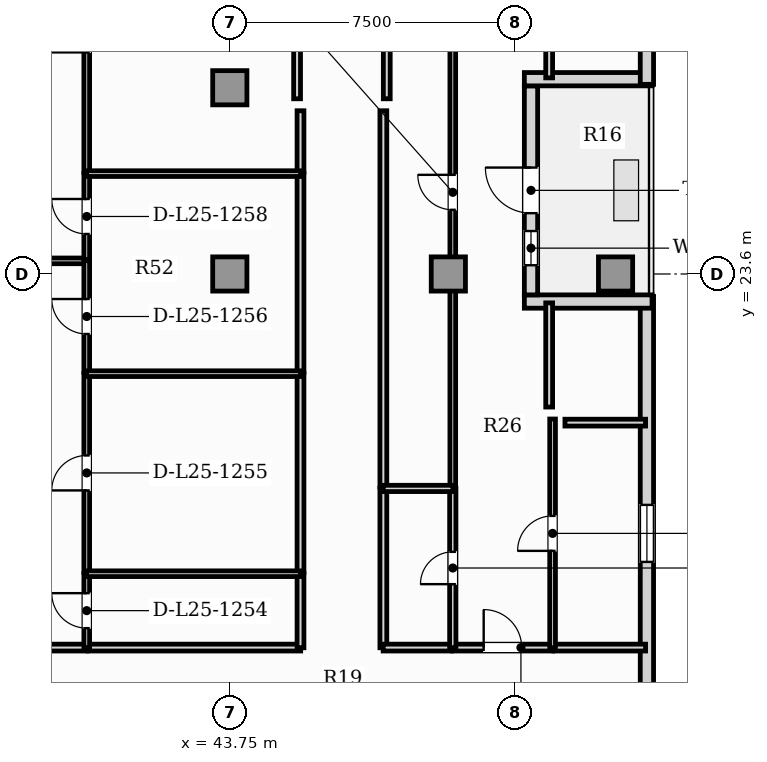
"""IFC4 building model, lengths in metres.
Left out: names, types, materials, properties, quantities, classifications, styles, units other than length and angle.
Written with IfcOpenShell. Run it as: python <this file> out.ifc"""

import sys

from ifc_helpers import new_model, si_unit, direction, frame, frame_2d, origin, origin_2d, place, context, subcontext, project, spatial, rectangle, extrude, element, fill, save


model = new_model("IFC4")
c1 = context("Model", 3, precision=1e-05, world=origin(), true_north=direction((0.0, 1.0)))
c2 = subcontext(c1, "Body", "Model", "MODEL_VIEW")
j1 = project(units=[si_unit("LENGTHUNIT", "METRE"), si_unit("PLANEANGLEUNIT", "RADIAN")], contexts=[c1])
p1 = place(None, origin())
s1 = spatial("IfcSite", under=j1, at=p1, CompositionType="ELEMENT")
p2 = place(p1, origin())
s2 = spatial("IfcBuilding", under=s1, at=p2, CompositionType="ELEMENT")
p3 = place(p2, frame((0.0, 0.0, 104.15)))
s3 = spatial("IfcBuildingStorey", under=s2, at=p3, CompositionType="ELEMENT", Elevation=104.15)
for number, where, z_axis, x_axis in (
    (1, (43.75, 23.6, 0.0), (0.0, 0.0, 1.0), (1.0, 0.0, 0.0)),
    (2, (49.5, 23.6, 0.0), (0.0, 0.0, 1.0), (1.0, 0.0, 0.0)),
    (3, (53.9, 23.6, 0.0), (0.0, 0.0, 1.0), (1.0, 0.0, 0.0)),
    (4, (43.75, 28.5, 0.0), (0.0, 0.0, 1.0), (1.0, 0.0, 0.0)),
):
    element("IfcColumn", number, at=place(p3, frame(where, z_axis=z_axis, x_axis=x_axis)), inside=s3, PredefinedType="COLUMN", context=c2, shape_type="SweptSolid", body=[
        extrude(rectangle(XDim=0.9, YDim=0.9, at=origin_2d()), origin(), (0.0, 0.0, 1.0), 3.85),
    ])
p4 = place(p3, frame((54.725, 3.24, 0.0), z_axis=(0.0, 0.0, 1.0), x_axis=(0.0, 1.0, 0.0)))
e5 = element("IfcWall", 5, at=p4, inside=s3, PredefinedType="SOLIDWALL", context=c2, shape_type="SweptSolid", body=[
    extrude(rectangle(XDim=19.77, YDim=0.35, at=frame_2d((9.885, 0.0))), origin(), (0.0, 0.0, 1.0), 3.6),
])
p5 = place(p4, frame((12.784, 0.0, 0.9)))
e6 = element("IfcOpeningElement", 6, at=p5, cuts=e5, PredefinedType="OPENING", context=c2, shape_type="SweptSolid", body=[
    extrude(rectangle(XDim=1.5, YDim=1.95, at=frame_2d((0.75, 0.975))), frame((0.0, 0.185, 0.0), z_axis=(0.0, -1.0, 0.0), x_axis=(1.0, 0.0, 0.0)), (0.0, 0.0, 1.0), 0.37),
])
p6 = place(p3, frame((54.86, 22.875, 0.0), z_axis=(0.0, 0.0, 1.0), x_axis=(-1.0, 0.0, 0.0)))
e7 = element("IfcWall", 7, at=p6, inside=s3, PredefinedType="SOLIDWALL", context=c2, shape_type="SweptSolid", body=[
    extrude(rectangle(XDim=3.36, YDim=0.35, at=frame_2d((1.68, 0.0))), origin(), (0.0, 0.0, 1.0), 3.6),
])
p7 = place(p3, frame((51.675, 23.05, 0.0), z_axis=(0.0, 0.0, 1.0), x_axis=(0.0, 1.0, 0.0)))
e8 = element("IfcWall", 8, at=p7, inside=s3, PredefinedType="SOLIDWALL", context=c2, shape_type="SweptSolid", body=[
    extrude(rectangle(XDim=5.5, YDim=0.35, at=frame_2d((2.75, 0.0))), origin(), (0.0, 0.0, 1.0), 3.6),
])
p8 = place(p7, frame((2.15, 0.0, 0.0)))
e9 = element("IfcOpeningElement", 9, at=p8, cuts=e8, PredefinedType="OPENING", context=c2, shape_type="SweptSolid", body=[
    extrude(rectangle(XDim=1.2, YDim=2.2, at=frame_2d((0.6, 1.1))), frame((0.0, 0.185, 0.0), z_axis=(0.0, -1.0, 0.0), x_axis=(1.0, 0.0, 0.0)), (0.0, 0.0, 1.0), 0.37),
])
p9 = place(p7, frame((0.78, 0.0, 0.95)))
e10 = element("IfcOpeningElement", 10, at=p9, cuts=e8, PredefinedType="OPENING", context=c2, shape_type="SweptSolid", body=[
    extrude(rectangle(XDim=0.9, YDim=1.5, at=frame_2d((0.45, 0.75))), frame((0.0, 0.185, 0.0), z_axis=(0.0, -1.0, 0.0), x_axis=(1.0, 0.0, 0.0)), (0.0, 0.0, 1.0), 0.37),
])
p10 = place(p3, frame((51.5, 28.725, 0.0), z_axis=(0.0, 0.0, 1.0), x_axis=(1.0, 0.0, 0.0)))
e11 = element("IfcWall", 11, at=p10, inside=s3, PredefinedType="SOLIDWALL", context=c2, shape_type="SweptSolid", body=[
    extrude(rectangle(XDim=3.36, YDim=0.35, at=frame_2d((1.68, 0.0))), origin(), (0.0, 0.0, 1.0), 3.6),
])
p11 = place(p3, frame((54.725, 28.59, 0.0), z_axis=(0.0, 0.0, 1.0), x_axis=(0.0, 1.0, 0.0)))
e12 = element("IfcWall", 12, at=p11, inside=s3, PredefinedType="SOLIDWALL", context=c2, shape_type="SweptSolid", body=[
    extrude(rectangle(XDim=11.37, YDim=0.35, at=frame_2d((5.685, 0.0))), origin(), (0.0, 0.0, 1.0), 3.6),
])
p12 = place(p11, frame((7.472, 0.0, 0.9)))
e13 = element("IfcOpeningElement", 13, at=p12, cuts=e12, PredefinedType="OPENING", context=c2, shape_type="SweptSolid", body=[
    extrude(rectangle(XDim=1.5, YDim=1.95, at=frame_2d((0.75, 0.975))), frame((0.0, 0.185, 0.0), z_axis=(0.0, -1.0, 0.0), x_axis=(1.0, 0.0, 0.0)), (0.0, 0.0, 1.0), 0.37),
])
p13 = place(p3, frame((49.612, 13.77, 0.0), z_axis=(0.0, 0.0, 1.0), x_axis=(1.0, 0.0, 0.0)))
e14 = element("IfcWall", 14, at=p13, inside=s3, PredefinedType="PARTITIONING", context=c2, shape_type="SweptSolid", body=[
    extrude(rectangle(XDim=2.636, YDim=0.18, at=frame_2d((1.318, 0.0))), origin(), (0.0, 0.0, 1.0), 3.6),
])
p14 = place(p13, frame((0.818, 0.0, 0.0)))
e15 = element("IfcOpeningElement", 15, at=p14, cuts=e14, PredefinedType="OPENING", context=c2, shape_type="SweptSolid", body=[
    extrude(rectangle(XDim=1.0, YDim=2.15, at=frame_2d((0.5, 1.075))), frame((0.0, 0.1, 0.0), z_axis=(0.0, -1.0, 0.0), x_axis=(1.0, 0.0, 0.0)), (0.0, 0.0, 1.0), 0.2),
])
p15 = place(p3, frame((47.79, 13.765, 0.0), z_axis=(0.0, 0.0, 1.0), x_axis=(0.0, 1.0, 0.0)))
e16 = element("IfcWall", 16, at=p15, inside=s3, PredefinedType="PARTITIONING", context=c2, shape_type="SweptSolid", body=[
    extrude(rectangle(XDim=4.198, YDim=0.18, at=frame_2d((2.099, 0.0))), origin(), (0.0, 0.0, 1.0), 3.6),
])
p16 = place(p3, frame((47.785, 13.77, 0.0), z_axis=(0.0, 0.0, 1.0), x_axis=(1.0, 0.0, 0.0)))
e17 = element("IfcWall", 17, at=p16, inside=s3, PredefinedType="PARTITIONING", context=c2, shape_type="SweptSolid", body=[
    extrude(rectangle(XDim=1.797, YDim=0.18, at=frame_2d((0.898, 0.0))), origin(), (0.0, 0.0, 1.0), 3.6),
])
p17 = place(p3, frame((47.79, 17.992, 0.0), z_axis=(0.0, 0.0, 1.0), x_axis=(0.0, 1.0, 0.0)))
e18 = element("IfcWall", 18, at=p17, inside=s3, PredefinedType="PARTITIONING", context=c2, shape_type="SweptSolid", body=[
    extrude(rectangle(XDim=9.903, YDim=0.18, at=frame_2d((4.951, 0.0))), origin(), (0.0, 0.0, 1.0), 3.6),
])
p18 = place(p3, frame((52.278, 13.77, 0.0), z_axis=(0.0, 0.0, 1.0), x_axis=(1.0, 0.0, 0.0)))
e19 = element("IfcWall", 19, at=p18, inside=s3, PredefinedType="PARTITIONING", context=c2, shape_type="SweptSolid", body=[
    extrude(rectangle(XDim=2.412, YDim=0.18, at=frame_2d((1.206, 0.0))), origin(), (0.0, 0.0, 1.0), 3.6),
])
p19 = place(p3, frame((35.0, 13.77, 0.0), z_axis=(0.0, 0.0, 1.0), x_axis=(1.0, 0.0, 0.0)))
e20 = element("IfcWall", 20, at=p19, inside=s3, PredefinedType="PARTITIONING", context=c2, shape_type="SweptSolid", body=[
    extrude(rectangle(XDim=4.99, YDim=0.18, at=frame_2d((2.495, 0.0))), origin(), (0.0, 0.0, 1.0), 3.6),
])
p20 = place(p19, frame((1.995, 0.0, 0.0)))
e21 = element("IfcOpeningElement", 21, at=p20, cuts=e20, PredefinedType="OPENING", context=c2, shape_type="SweptSolid", body=[
    extrude(rectangle(XDim=1.0, YDim=2.15, at=frame_2d((0.5, 1.075))), frame((0.0, 0.1, 0.0), z_axis=(0.0, -1.0, 0.0), x_axis=(1.0, 0.0, 0.0)), (0.0, 0.0, 1.0), 0.2),
])
p21 = place(p3, frame((40.021, 13.77, 0.0), z_axis=(0.0, 0.0, 1.0), x_axis=(1.0, 0.0, 0.0)))
e22 = element("IfcWall", 22, at=p21, inside=s3, PredefinedType="PARTITIONING", context=c2, shape_type="SweptSolid", body=[
    extrude(rectangle(XDim=5.594, YDim=0.18, at=frame_2d((2.797, 0.0))), origin(), (0.0, 0.0, 1.0), 3.6),
])
p22 = place(p3, frame((45.61, 13.765, 0.0), z_axis=(0.0, 0.0, 1.0), x_axis=(0.0, 1.0, 0.0)))
e23 = element("IfcWall", 23, at=p22, inside=s3, PredefinedType="PARTITIONING", context=c2, shape_type="SweptSolid", body=[
    extrude(rectangle(XDim=1.953, YDim=0.18, at=frame_2d((0.977, 0.0))), origin(), (0.0, 0.0, 1.0), 3.6),
])
for number, where, z_axis, x_axis in (
    (24, (45.61, 15.748, 0.0), (0.0, 0.0, 1.0), (0.0, 1.0, 0.0)),
    (25, (45.61, 21.012, 0.0), (0.0, 0.0, 1.0), (0.0, 1.0, 0.0)),
):
    element("IfcWall", number, at=place(p3, frame(where, z_axis=z_axis, x_axis=x_axis)), inside=s3, PredefinedType="PARTITIONING", context=c2, shape_type="SweptSolid", body=[
        extrude(rectangle(XDim=5.234, YDim=0.18, at=frame_2d((2.617, 0.0))), origin(), (0.0, 0.0, 1.0), 3.6),
    ])
p23 = place(p3, frame((45.61, 26.276, 0.0), z_axis=(0.0, 0.0, 1.0), x_axis=(0.0, 1.0, 0.0)))
e26 = element("IfcWall", 26, at=p23, inside=s3, PredefinedType="PARTITIONING", context=c2, shape_type="SweptSolid", body=[
    extrude(rectangle(XDim=1.619, YDim=0.18, at=frame_2d((0.81, 0.0))), origin(), (0.0, 0.0, 1.0), 3.6),
])
p24 = place(p3, frame((49.617, 13.765, 0.0), z_axis=(0.0, 0.0, 1.0), x_axis=(0.0, 1.0, 0.0)))
e27 = element("IfcWall", 27, at=p24, inside=s3, PredefinedType="PLUMBINGWALL", context=c2, shape_type="SweptSolid", body=[
    extrude(rectangle(XDim=4.198, YDim=0.165, at=frame_2d((2.099, 0.0))), origin(), (0.0, 0.0, 1.0), 3.056),
])
p25 = place(p24, frame((1.674, 0.0, 0.0)))
e28 = element("IfcOpeningElement", 28, at=p25, cuts=e27, PredefinedType="OPENING", context=c2, shape_type="SweptSolid", body=[
    extrude(rectangle(XDim=0.85, YDim=2.1, at=frame_2d((0.425, 1.05))), frame((0.0, 0.093, 0.0), z_axis=(0.0, -1.0, 0.0), x_axis=(1.0, 0.0, 0.0)), (0.0, 0.0, 1.0), 0.185),
])
p26 = place(p3, frame((49.617, 17.992, 0.0), z_axis=(0.0, 0.0, 1.0), x_axis=(0.0, 1.0, 0.0)))
e29 = element("IfcWall", 29, at=p26, inside=s3, PredefinedType="PARTITIONING", context=c2, shape_type="SweptSolid", body=[
    extrude(rectangle(XDim=15.513, YDim=0.15, at=frame_2d((7.756, 0.0))), origin(), (0.0, 0.0, 1.0), 3.056),
])
p27 = place(p26, frame((7.296, 0.0, 0.0)))
e30 = element("IfcOpeningElement", 30, at=p27, cuts=e29, PredefinedType="OPENING", context=c2, shape_type="SweptSolid", body=[
    extrude(rectangle(XDim=0.92, YDim=2.1, at=frame_2d((0.46, 1.05))), frame((0.0, 0.085, 0.0), z_axis=(0.0, -1.0, 0.0), x_axis=(1.0, 0.0, 0.0)), (0.0, 0.0, 1.0), 0.17),
])
p28 = place(p3, frame((52.243, 13.765, 0.0), z_axis=(0.0, 0.0, 1.0), x_axis=(0.0, 1.0, 0.0)))
e31 = element("IfcWall", 31, at=p28, inside=s3, PredefinedType="PARTITIONING", context=c2, shape_type="SweptSolid", body=[
    extrude(rectangle(XDim=6.019, YDim=0.15, at=frame_2d((3.009, 0.0))), origin(), (0.0, 0.0, 1.0), 3.6),
])
p29 = place(p28, frame((2.549, 0.0, 0.0)))
e32 = element("IfcOpeningElement", 32, at=p29, cuts=e31, PredefinedType="OPENING", context=c2, shape_type="SweptSolid", body=[
    extrude(rectangle(XDim=0.92, YDim=2.1, at=frame_2d((0.46, 1.05))), frame((0.0, 0.085, 0.0), z_axis=(0.0, -1.0, 0.0), x_axis=(1.0, 0.0, 0.0)), (0.0, 0.0, 1.0), 0.17),
])
p30 = place(p3, frame((47.785, 17.957, 0.0), z_axis=(0.0, 0.0, 1.0), x_axis=(1.0, 0.0, 0.0)))
e33 = element("IfcWall", 33, at=p30, inside=s3, PredefinedType="PLUMBINGWALL", context=c2, shape_type="SweptSolid", body=[
    extrude(rectangle(XDim=1.837, YDim=0.165, at=frame_2d((0.918, 0.0))), origin(), (0.0, 0.0, 1.0), 3.6),
])
p31 = place(p3, frame((35.0, 23.945, 0.0), z_axis=(0.0, 0.0, 1.0), x_axis=(1.0, 0.0, 0.0)))
e34 = element("IfcWall", 34, at=p31, inside=s3, PredefinedType="PARTITIONING", context=c2, shape_type="SweptSolid", body=[
    extrude(rectangle(XDim=4.99, YDim=0.15, at=frame_2d((2.495, 0.0))), origin(), (0.0, 0.0, 1.0), 3.6),
])
p32 = place(p31, frame((2.035, 0.0, 0.0)))
e35 = element("IfcOpeningElement", 35, at=p32, cuts=e34, PredefinedType="OPENING", context=c2, shape_type="SweptSolid", body=[
    extrude(rectangle(XDim=0.92, YDim=2.1, at=frame_2d((0.46, 1.05))), frame((0.0, 0.085, 0.0), z_axis=(0.0, -1.0, 0.0), x_axis=(1.0, 0.0, 0.0)), (0.0, 0.0, 1.0), 0.17),
])
p33 = place(p3, frame((39.986, 13.765, 0.0), z_axis=(0.0, 0.0, 1.0), x_axis=(0.0, 1.0, 0.0)))
e36 = element("IfcWall", 36, at=p33, inside=s3, PredefinedType="PARTITIONING", context=c2, shape_type="SweptSolid", body=[
    extrude(rectangle(XDim=1.953, YDim=0.15, at=frame_2d((0.977, 0.0))), origin(), (0.0, 0.0, 1.0), 3.6),
])
p34 = place(p33, frame((0.517, 0.0, 0.0)))
e37 = element("IfcOpeningElement", 37, at=p34, cuts=e36, PredefinedType="OPENING", context=c2, shape_type="SweptSolid", body=[
    extrude(rectangle(XDim=0.92, YDim=2.1, at=frame_2d((0.46, 1.05))), frame((0.0, 0.085, 0.0), z_axis=(0.0, -1.0, 0.0), x_axis=(1.0, 0.0, 0.0)), (0.0, 0.0, 1.0), 0.17),
])
p35 = place(p3, frame((39.986, 15.748, 0.0), z_axis=(0.0, 0.0, 1.0), x_axis=(0.0, 1.0, 0.0)))
e38 = element("IfcWall", 38, at=p35, inside=s3, PredefinedType="PARTITIONING", context=c2, shape_type="SweptSolid", body=[
    extrude(rectangle(XDim=5.234, YDim=0.15, at=frame_2d((2.617, 0.0))), origin(), (0.0, 0.0, 1.0), 3.6),
])
p36 = place(p35, frame((2.157, 0.0, 0.0)))
e39 = element("IfcOpeningElement", 39, at=p36, cuts=e38, PredefinedType="OPENING", context=c2, shape_type="SweptSolid", body=[
    extrude(rectangle(XDim=0.92, YDim=2.1, at=frame_2d((0.46, 1.05))), frame((0.0, 0.085, 0.0), z_axis=(0.0, -1.0, 0.0), x_axis=(1.0, 0.0, 0.0)), (0.0, 0.0, 1.0), 0.17),
])
p37 = place(p3, frame((39.986, 21.012, 0.0), z_axis=(0.0, 0.0, 1.0), x_axis=(0.0, 1.0, 0.0)))
e40 = element("IfcWall", 40, at=p37, inside=s3, PredefinedType="PARTITIONING", context=c2, shape_type="SweptSolid", body=[
    extrude(rectangle(XDim=2.938, YDim=0.15, at=frame_2d((1.469, 0.0))), origin(), (0.0, 0.0, 1.0), 3.6),
])
p38 = place(p37, frame((1.009, 0.0, 0.0)))
e41 = element("IfcOpeningElement", 41, at=p38, cuts=e40, PredefinedType="OPENING", context=c2, shape_type="SweptSolid", body=[
    extrude(rectangle(XDim=0.92, YDim=2.1, at=frame_2d((0.46, 1.05))), frame((0.0, 0.085, 0.0), z_axis=(0.0, -1.0, 0.0), x_axis=(1.0, 0.0, 0.0)), (0.0, 0.0, 1.0), 0.17),
])
p39 = place(p3, frame((39.986, 23.98, 0.0), z_axis=(0.0, 0.0, 1.0), x_axis=(0.0, 1.0, 0.0)))
e42 = element("IfcWall", 42, at=p39, inside=s3, PredefinedType="PARTITIONING", context=c2, shape_type="SweptSolid", body=[
    extrude(rectangle(XDim=2.265, YDim=0.15, at=frame_2d((1.133, 0.0))), origin(), (0.0, 0.0, 1.0), 3.6),
])
p40 = place(p39, frame((0.673, 0.0, 0.0)))
e43 = element("IfcOpeningElement", 43, at=p40, cuts=e42, PredefinedType="OPENING", context=c2, shape_type="SweptSolid", body=[
    extrude(rectangle(XDim=0.92, YDim=2.1, at=frame_2d((0.46, 1.05))), frame((0.0, 0.085, 0.0), z_axis=(0.0, -1.0, 0.0), x_axis=(1.0, 0.0, 0.0)), (0.0, 0.0, 1.0), 0.17),
])
p41 = place(p3, frame((39.986, 26.276, 0.0), z_axis=(0.0, 0.0, 1.0), x_axis=(0.0, 1.0, 0.0)))
e44 = element("IfcWall", 44, at=p41, inside=s3, PredefinedType="PARTITIONING", context=c2, shape_type="SweptSolid", body=[
    extrude(rectangle(XDim=7.229, YDim=0.15, at=frame_2d((3.615, 0.0))), origin(), (0.0, 0.0, 1.0), 3.6),
])
p42 = place(p41, frame((3.155, 0.0, 0.0)))
e45 = element("IfcOpeningElement", 45, at=p42, cuts=e44, PredefinedType="OPENING", context=c2, shape_type="SweptSolid", body=[
    extrude(rectangle(XDim=0.92, YDim=2.1, at=frame_2d((0.46, 1.05))), frame((0.0, 0.085, 0.0), z_axis=(0.0, -1.0, 0.0), x_axis=(1.0, 0.0, 0.0)), (0.0, 0.0, 1.0), 0.17),
])
for number, where, z_axis, x_axis in (
    (46, (39.981, 15.713, 0.0), (0.0, 0.0, 1.0), (1.0, 0.0, 0.0)),
    (47, (39.981, 20.977, 0.0), (0.0, 0.0, 1.0), (1.0, 0.0, 0.0)),
    (48, (39.981, 26.241, 0.0), (0.0, 0.0, 1.0), (1.0, 0.0, 0.0)),
):
    element("IfcWall", number, at=place(p3, frame(where, z_axis=z_axis, x_axis=x_axis)), inside=s3, PredefinedType="PARTITIONING", context=c2, shape_type="SweptSolid", body=[
        extrude(rectangle(XDim=5.634, YDim=0.15, at=frame_2d((2.817, 0.0))), origin(), (0.0, 0.0, 1.0), 3.6),
    ])
p43 = place(p3, frame((52.153, 33.685, 0.0), z_axis=(0.0, 0.0, 1.0), x_axis=(0.0, -1.0, 0.0)))
e49 = element("IfcWall", 49, at=p43, inside=s3, PredefinedType="PARTITIONING", context=c2, shape_type="SweptSolid", body=[
    extrude(rectangle(XDim=4.925, YDim=0.18, at=frame_2d((2.462, 0.0))), origin(), (0.0, 0.0, 1.0), 3.6),
])
p44 = place(p3, frame((52.153, 22.84, 0.0), z_axis=(0.0, 0.0, 1.0), x_axis=(0.0, -1.0, 0.0)))
e50 = element("IfcWall", 50, at=p44, inside=s3, PredefinedType="PARTITIONING", context=c2, shape_type="SweptSolid", body=[
    extrude(rectangle(XDim=2.741, YDim=0.18, at=frame_2d((1.371, 0.0))), origin(), (0.0, 0.0, 1.0), 3.6),
])
p45 = place(p3, frame((47.88, 28.21, 0.0), z_axis=(0.0, 0.0, 1.0), x_axis=(0.0, 1.0, 0.0)))
e51 = element("IfcWall", 51, at=p45, inside=s3, PredefinedType="PARTITIONING", context=c2, shape_type="SweptSolid", body=[
    extrude(rectangle(XDim=4.965, YDim=0.18, at=frame_2d((2.482, 0.0))), origin(), (0.0, 0.0, 1.0), 3.6),
])
p46 = place(p3, frame((52.568, 19.689, 0.0), z_axis=(0.0, 0.0, 1.0), x_axis=(1.0, 0.0, 0.0)))
e52 = element("IfcWall", 52, at=p46, inside=s3, PredefinedType="PARTITIONING", context=c2, shape_type="SweptSolid", body=[
    extrude(rectangle(XDim=2.122, YDim=0.18, at=frame_2d((1.061, 0.0))), origin(), (0.0, 0.0, 1.0), 3.6),
])
p47 = place(p3, frame((45.52, 33.175, 0.0), z_axis=(0.0, 0.0, 1.0), x_axis=(0.0, -1.0, 0.0)))
e53 = element("IfcWall", 53, at=p47, inside=s3, PredefinedType="PARTITIONING", context=c2, shape_type="SweptSolid", body=[
    extrude(rectangle(XDim=4.965, YDim=0.18, at=frame_2d((2.482, 0.0))), origin(), (0.0, 0.0, 1.0), 3.6),
])
p48 = place(p8, frame((1.2, 0.0, 0.0), z_axis=(0.0, 0.0, 1.0), x_axis=(-1.0, 0.0, 0.0)))
e54 = element("IfcDoor", 54, at=p48, inside=s3, OperationType="SINGLE_SWING_LEFT", PredefinedType="DOOR", context=c2, shape_type="SweptSolid", body=[
    extrude(rectangle(XDim=1.2, YDim=2.2, at=frame_2d((0.6, 1.1))), frame((0.0, 0.025, 0.0), z_axis=(0.0, -1.0, 0.0), x_axis=(1.0, 0.0, 0.0)), (0.0, 0.0, 1.0), 0.05),
])
fill(e9, e54)
p49 = place(p9, origin())
e55 = element("IfcWindow", 55, at=p49, inside=s3, PartitioningType="SINGLE_PANEL", PredefinedType="WINDOW", context=c2, shape_type="SweptSolid", body=[
    extrude(rectangle(XDim=0.9, YDim=1.5, at=frame_2d((0.45, 0.75))), frame((0.0, 0.03, 0.0), z_axis=(0.0, -1.0, 0.0), x_axis=(1.0, 0.0, 0.0)), (0.0, 0.0, 1.0), 0.06),
])
fill(e10, e55)
p50 = place(p5, origin())
e56 = element("IfcWindow", 56, at=p50, inside=s3, PartitioningType="SINGLE_PANEL", PredefinedType="WINDOW", context=c2, shape_type="SweptSolid", body=[
    extrude(rectangle(XDim=1.5, YDim=1.95, at=frame_2d((0.75, 0.975))), frame((0.0, 0.03, 0.0), z_axis=(0.0, -1.0, 0.0), x_axis=(1.0, 0.0, 0.0)), (0.0, 0.0, 1.0), 0.06),
])
fill(e6, e56)
p51 = place(p14, origin())
e57 = element("IfcDoor", 57, at=p51, inside=s3, OperationType="SINGLE_SWING_LEFT", PredefinedType="DOOR", context=c2, shape_type="SweptSolid", body=[
    extrude(rectangle(XDim=1.0, YDim=2.15, at=frame_2d((0.5, 1.075))), frame((0.0, 0.025, 0.0), z_axis=(0.0, -1.0, 0.0), x_axis=(1.0, 0.0, 0.0)), (0.0, 0.0, 1.0), 0.05),
])
fill(e15, e57)
p52 = place(p25, origin())
e58 = element("IfcDoor", 58, at=p52, inside=s3, OperationType="SINGLE_SWING_LEFT", PredefinedType="DOOR", context=c2, shape_type="SweptSolid", body=[
    extrude(rectangle(XDim=0.85, YDim=2.1, at=frame_2d((0.425, 1.05))), frame((0.0, 0.025, 0.0), z_axis=(0.0, -1.0, 0.0), x_axis=(1.0, 0.0, 0.0)), (0.0, 0.0, 1.0), 0.05),
])
fill(e28, e58)
p53 = place(p27, origin())
e59 = element("IfcDoor", 59, at=p53, inside=s3, OperationType="SINGLE_SWING_RIGHT", PredefinedType="DOOR", context=c2, shape_type="SweptSolid", body=[
    extrude(rectangle(XDim=0.92, YDim=2.1, at=frame_2d((0.46, 1.05))), frame((0.0, 0.025, 0.0), z_axis=(0.0, -1.0, 0.0), x_axis=(1.0, 0.0, 0.0)), (0.0, 0.0, 1.0), 0.05),
])
fill(e30, e59)
p54 = place(p29, origin())
e60 = element("IfcDoor", 60, at=p54, inside=s3, OperationType="SINGLE_SWING_LEFT", PredefinedType="DOOR", context=c2, shape_type="SweptSolid", body=[
    extrude(rectangle(XDim=0.92, YDim=2.1, at=frame_2d((0.46, 1.05))), frame((0.0, 0.025, 0.0), z_axis=(0.0, -1.0, 0.0), x_axis=(1.0, 0.0, 0.0)), (0.0, 0.0, 1.0), 0.05),
])
fill(e32, e60)
p55 = place(p34, origin())
e61 = element("IfcDoor", 61, at=p55, inside=s3, OperationType="SINGLE_SWING_RIGHT", PredefinedType="DOOR", context=c2, shape_type="SweptSolid", body=[
    extrude(rectangle(XDim=0.92, YDim=2.1, at=frame_2d((0.46, 1.05))), frame((0.0, 0.025, 0.0), z_axis=(0.0, -1.0, 0.0), x_axis=(1.0, 0.0, 0.0)), (0.0, 0.0, 1.0), 0.05),
])
fill(e37, e61)
p56 = place(p36, origin())
e62 = element("IfcDoor", 62, at=p56, inside=s3, OperationType="SINGLE_SWING_LEFT", PredefinedType="DOOR", context=c2, shape_type="SweptSolid", body=[
    extrude(rectangle(XDim=0.92, YDim=2.1, at=frame_2d((0.46, 1.05))), frame((0.0, 0.025, 0.0), z_axis=(0.0, -1.0, 0.0), x_axis=(1.0, 0.0, 0.0)), (0.0, 0.0, 1.0), 0.05),
])
fill(e39, e62)
p57 = place(p38, origin())
e63 = element("IfcDoor", 63, at=p57, inside=s3, OperationType="SINGLE_SWING_RIGHT", PredefinedType="DOOR", context=c2, shape_type="SweptSolid", body=[
    extrude(rectangle(XDim=0.92, YDim=2.1, at=frame_2d((0.46, 1.05))), frame((0.0, 0.025, 0.0), z_axis=(0.0, -1.0, 0.0), x_axis=(1.0, 0.0, 0.0)), (0.0, 0.0, 1.0), 0.05),
])
fill(e41, e63)
p58 = place(p40, origin())
e64 = element("IfcDoor", 64, at=p58, inside=s3, OperationType="SINGLE_SWING_RIGHT", PredefinedType="DOOR", context=c2, shape_type="SweptSolid", body=[
    extrude(rectangle(XDim=0.92, YDim=2.1, at=frame_2d((0.46, 1.05))), frame((0.0, 0.025, 0.0), z_axis=(0.0, -1.0, 0.0), x_axis=(1.0, 0.0, 0.0)), (0.0, 0.0, 1.0), 0.05),
])
fill(e43, e64)
save(model, sys.argv[1])
